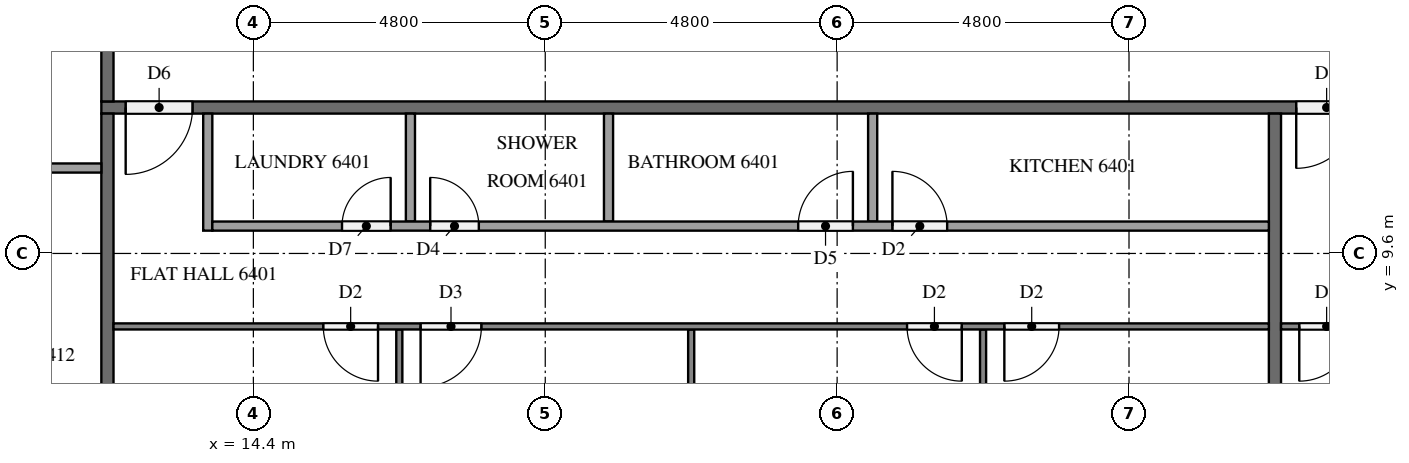
"""IFC4 building model, lengths in metres.
Left out: names, types, materials, properties, quantities, classifications, styles, units other than length and angle.
Written with IfcOpenShell. Run it as: python <this file> out.ifc"""

import sys

from ifc_helpers import new_model, si_unit, direction, frame, frame_2d, origin, place, context, subcontext, project, spatial, rectangle, extrude, element, fill, save


model = new_model("IFC4")
c1 = context("Model", 3, precision=1e-05, world=origin(), true_north=direction((0.0, 1.0)))
c2 = subcontext(c1, "Body", "Model", "MODEL_VIEW")
j1 = project(units=[si_unit("LENGTHUNIT", "METRE"), si_unit("PLANEANGLEUNIT", "RADIAN")], contexts=[c1])
p1 = place(None, origin())
s1 = spatial("IfcSite", under=j1, at=p1, CompositionType="ELEMENT")
p2 = place(p1, origin())
s2 = spatial("IfcBuilding", under=s1, at=p2, CompositionType="ELEMENT")
p3 = place(p2, frame((0.0, 0.0, 245.7)))
s3 = spatial("IfcBuildingStorey", under=s2, at=p3, CompositionType="ELEMENT", Elevation=245.7)
p4 = place(p3, frame((50.5, 12.0, 0.0), z_axis=(0.0, 0.0, 1.0), x_axis=(-1.0, 0.0, 0.0)))
e1 = element("IfcWall", 1, at=p4, inside=s3, PredefinedType="PARTITIONING", context=c2, shape_type="SweptSolid", body=[
    extrude(rectangle(XDim=38.6, YDim=0.2, at=frame_2d((19.3, 0.0))), origin(), (0.0, 0.0, 1.0), 3.2),
])
p5 = place(p4, frame((37.1, 0.0, 0.0)))
e2 = element("IfcOpeningElement", 2, at=p5, cuts=e1, PredefinedType="OPENING", context=c2, shape_type="SweptSolid", body=[
    extrude(rectangle(XDim=1.1, YDim=2.1, at=frame_2d((0.55, 1.05))), frame((0.0, 0.11, 0.0), z_axis=(0.0, -1.0, 0.0), x_axis=(1.0, 0.0, 0.0)), (0.0, 0.0, 1.0), 0.22),
])
p6 = place(p4, frame((17.95, 0.0, 0.0)))
e3 = element("IfcOpeningElement", 3, at=p6, cuts=e1, PredefinedType="OPENING", context=c2, shape_type="SweptSolid", body=[
    extrude(rectangle(XDim=1.0, YDim=2.1, at=frame_2d((0.5, 1.05))), frame((0.0, 0.11, 0.0), z_axis=(0.0, -1.0, 0.0), x_axis=(1.0, 0.0, 0.0)), (0.0, 0.0, 1.0), 0.22),
])
p7 = place(p4, frame((8.35, 0.0, 0.0)))
e4 = element("IfcOpeningElement", 4, at=p7, cuts=e1, PredefinedType="OPENING", context=c2, shape_type="SweptSolid", body=[
    extrude(rectangle(XDim=1.0, YDim=2.1, at=frame_2d((0.5, 1.05))), frame((0.0, 0.11, 0.0), z_axis=(0.0, -1.0, 0.0), x_axis=(1.0, 0.0, 0.0)), (0.0, 0.0, 1.0), 0.22),
])
p8 = place(p3, frame((12.0, 12.1, 0.0), z_axis=(0.0, 0.0, 1.0), x_axis=(0.0, 1.0, 0.0)))
e5 = element("IfcWall", 5, at=p8, inside=s3, PredefinedType="PARTITIONING", context=c2, shape_type="SweptSolid", body=[
    extrude(rectangle(XDim=28.6, YDim=0.2, at=frame_2d((14.3, 0.0))), origin(), (0.0, 0.0, 1.0), 3.2),
])
p9 = place(p8, frame((27.35, 0.0, 0.0)))
e6 = element("IfcOpeningElement", 6, at=p9, cuts=e5, PredefinedType="OPENING", context=c2, shape_type="SweptSolid", body=[
    extrude(rectangle(XDim=1.0, YDim=2.1, at=frame_2d((0.5, 1.05))), frame((0.0, 0.11, 0.0), z_axis=(0.0, -1.0, 0.0), x_axis=(1.0, 0.0, 0.0)), (0.0, 0.0, 1.0), 0.22),
])
p10 = place(p8, frame((17.75, 0.0, 0.0)))
e7 = element("IfcOpeningElement", 7, at=p10, cuts=e5, PredefinedType="OPENING", context=c2, shape_type="SweptSolid", body=[
    extrude(rectangle(XDim=1.0, YDim=2.1, at=frame_2d((0.5, 1.05))), frame((0.0, 0.11, 0.0), z_axis=(0.0, -1.0, 0.0), x_axis=(1.0, 0.0, 0.0)), (0.0, 0.0, 1.0), 0.22),
])
p11 = place(p8, frame((3.35, 0.0, 0.0)))
e8 = element("IfcOpeningElement", 8, at=p11, cuts=e5, PredefinedType="OPENING", context=c2, shape_type="SweptSolid", body=[
    extrude(rectangle(XDim=1.0, YDim=2.1, at=frame_2d((0.5, 1.05))), frame((0.0, 0.11, 0.0), z_axis=(0.0, -1.0, 0.0), x_axis=(1.0, 0.0, 0.0)), (0.0, 0.0, 1.0), 0.22),
])
for number, where, z_axis, x_axis in (
    (9, (31.2, 11.9, 0.0), (0.0, 0.0, 1.0), (0.0, -1.0, 0.0)),
    (10, (12.0, 4.9, 0.0), (0.0, 0.0, 1.0), (0.0, 1.0, 0.0)),
):
    element("IfcWall", number, at=place(p3, frame(where, z_axis=z_axis, x_axis=x_axis)), inside=s3, PredefinedType="PARTITIONING", context=c2, shape_type="SweptSolid", body=[
        extrude(rectangle(XDim=7.0, YDim=0.2, at=frame_2d((3.5, 0.0))), origin(), (0.0, 0.0, 1.0), 3.2),
    ])
for number, where, z_axis, x_axis in (
    (11, (16.8, 8.35, 0.0), (0.0, 0.0, 1.0), (0.0, -1.0, 0.0)),
    (12, (21.6, 8.35, 0.0), (0.0, 0.0, 1.0), (0.0, -1.0, 0.0)),
    (13, (26.4, 8.35, 0.0), (0.0, 0.0, 1.0), (0.0, -1.0, 0.0)),
):
    element("IfcWall", number, at=place(p3, frame(where, z_axis=z_axis, x_axis=x_axis)), inside=s3, PredefinedType="PARTITIONING", context=c2, shape_type="SweptSolid", body=[
        extrude(rectangle(XDim=3.45, YDim=0.1, at=frame_2d((1.725, 0.0))), origin(), (0.0, 0.0, 1.0), 3.2),
    ])
p12 = place(p3, frame((31.1, 8.4, 0.0), z_axis=(0.0, 0.0, 1.0), x_axis=(-1.0, 0.0, 0.0)))
e14 = element("IfcWall", 14, at=p12, inside=s3, PredefinedType="PARTITIONING", context=c2, shape_type="SweptSolid", body=[
    extrude(rectangle(XDim=19.0, YDim=0.1, at=frame_2d((9.5, 0.0))), origin(), (0.0, 0.0, 1.0), 3.2),
])
p13 = place(p12, frame((14.65, 0.0, 0.0)))
e15 = element("IfcOpeningElement", 15, at=p13, cuts=e14, PredefinedType="OPENING", context=c2, shape_type="SweptSolid", body=[
    extrude(rectangle(XDim=0.9, YDim=2.1, at=frame_2d((0.45, 1.05))), frame((0.0, 0.06, 0.0), z_axis=(0.0, -1.0, 0.0), x_axis=(1.0, 0.0, 0.0)), (0.0, 0.0, 1.0), 0.12),
])
p14 = place(p12, frame((12.95, 0.0, 0.0)))
e16 = element("IfcOpeningElement", 16, at=p14, cuts=e14, PredefinedType="OPENING", context=c2, shape_type="SweptSolid", body=[
    extrude(rectangle(XDim=1.0, YDim=2.1, at=frame_2d((0.5, 1.05))), frame((0.0, 0.06, 0.0), z_axis=(0.0, -1.0, 0.0), x_axis=(1.0, 0.0, 0.0)), (0.0, 0.0, 1.0), 0.12),
])
p15 = place(p12, frame((5.05, 0.0, 0.0)))
e17 = element("IfcOpeningElement", 17, at=p15, cuts=e14, PredefinedType="OPENING", context=c2, shape_type="SweptSolid", body=[
    extrude(rectangle(XDim=0.9, YDim=2.1, at=frame_2d((0.45, 1.05))), frame((0.0, 0.06, 0.0), z_axis=(0.0, -1.0, 0.0), x_axis=(1.0, 0.0, 0.0)), (0.0, 0.0, 1.0), 0.12),
])
p16 = place(p12, frame((3.45, 0.0, 0.0)))
e18 = element("IfcOpeningElement", 18, at=p16, cuts=e14, PredefinedType="OPENING", context=c2, shape_type="SweptSolid", body=[
    extrude(rectangle(XDim=0.9, YDim=2.1, at=frame_2d((0.45, 1.05))), frame((0.0, 0.06, 0.0), z_axis=(0.0, -1.0, 0.0), x_axis=(1.0, 0.0, 0.0)), (0.0, 0.0, 1.0), 0.12),
])
for number, where, z_axis, x_axis in (
    (19, (16.983, 11.9, 0.0), (0.0, 0.0, 1.0), (0.0, -1.0, 0.0)),
    (20, (20.24, 11.9, 0.0), (0.0, 0.0, 1.0), (0.0, -1.0, 0.0)),
    (21, (24.584, 11.9, 0.0), (0.0, 0.0, 1.0), (0.0, -1.0, 0.0)),
):
    element("IfcWall", number, at=place(p3, frame(where, z_axis=z_axis, x_axis=x_axis)), inside=s3, PredefinedType="PARTITIONING", context=c2, shape_type="SweptSolid", body=[
        extrude(rectangle(XDim=1.775, YDim=0.15, at=frame_2d((0.887, 0.0))), origin(), (0.0, 0.0, 1.0), 3.2),
    ])
p17 = place(p3, frame((13.65, 11.9, 0.0), z_axis=(0.0, 0.0, 1.0), x_axis=(0.0, -1.0, 0.0)))
e22 = element("IfcWall", 22, at=p17, inside=s3, PredefinedType="PARTITIONING", context=c2, shape_type="SweptSolid", body=[
    extrude(rectangle(XDim=1.925, YDim=0.15, at=frame_2d((0.962, 0.0))), origin(), (0.0, 0.0, 1.0), 3.2),
])
p18 = place(p3, frame((13.725, 10.05, 0.0), z_axis=(0.0, 0.0, 1.0), x_axis=(1.0, 0.0, 0.0)))
e23 = element("IfcWall", 23, at=p18, inside=s3, PredefinedType="PARTITIONING", context=c2, shape_type="SweptSolid", body=[
    extrude(rectangle(XDim=17.375, YDim=0.15, at=frame_2d((8.688, 0.0))), origin(), (0.0, 0.0, 1.0), 3.2),
])
p19 = place(p18, frame((2.133, 0.0, 0.0)))
e24 = element("IfcOpeningElement", 24, at=p19, cuts=e23, PredefinedType="OPENING", context=c2, shape_type="SweptSolid", body=[
    extrude(rectangle(XDim=0.8, YDim=2.1, at=frame_2d((0.4, 1.05))), frame((0.0, 0.085, 0.0), z_axis=(0.0, -1.0, 0.0), x_axis=(1.0, 0.0, 0.0)), (0.0, 0.0, 1.0), 0.17),
])
p20 = place(p18, frame((3.583, 0.0, 0.0)))
e25 = element("IfcOpeningElement", 25, at=p20, cuts=e23, PredefinedType="OPENING", context=c2, shape_type="SweptSolid", body=[
    extrude(rectangle(XDim=0.8, YDim=2.1, at=frame_2d((0.4, 1.05))), frame((0.0, 0.085, 0.0), z_axis=(0.0, -1.0, 0.0), x_axis=(1.0, 0.0, 0.0)), (0.0, 0.0, 1.0), 0.17),
])
p21 = place(p18, frame((9.635, 0.0, 0.0)))
e26 = element("IfcOpeningElement", 26, at=p21, cuts=e23, PredefinedType="OPENING", context=c2, shape_type="SweptSolid", body=[
    extrude(rectangle(XDim=0.9, YDim=2.1, at=frame_2d((0.45, 1.05))), frame((0.0, 0.085, 0.0), z_axis=(0.0, -1.0, 0.0), x_axis=(1.0, 0.0, 0.0)), (0.0, 0.0, 1.0), 0.17),
])
p22 = place(p18, frame((11.184, 0.0, 0.0)))
e27 = element("IfcOpeningElement", 27, at=p22, cuts=e23, PredefinedType="OPENING", context=c2, shape_type="SweptSolid", body=[
    extrude(rectangle(XDim=0.9, YDim=2.1, at=frame_2d((0.45, 1.05))), frame((0.0, 0.085, 0.0), z_axis=(0.0, -1.0, 0.0), x_axis=(1.0, 0.0, 0.0)), (0.0, 0.0, 1.0), 0.17),
])
p23 = place(p3, frame((40.7, 8.4, 0.0), z_axis=(0.0, 0.0, 1.0), x_axis=(-1.0, 0.0, 0.0)))
e28 = element("IfcWall", 28, at=p23, inside=s3, PredefinedType="PARTITIONING", context=c2, shape_type="SweptSolid", body=[
    extrude(rectangle(XDim=9.4, YDim=0.1, at=frame_2d((4.7, 0.0))), origin(), (0.0, 0.0, 1.0), 3.2),
])
p24 = place(p23, frame((8.2, 0.0, 0.0)))
e29 = element("IfcOpeningElement", 29, at=p24, cuts=e28, PredefinedType="OPENING", context=c2, shape_type="SweptSolid", body=[
    extrude(rectangle(XDim=0.9, YDim=2.1, at=frame_2d((0.45, 1.05))), frame((0.0, 0.06, 0.0), z_axis=(0.0, -1.0, 0.0), x_axis=(1.0, 0.0, 0.0)), (0.0, 0.0, 1.0), 0.12),
])
p25 = place(p23, frame((0.3, 0.0, 0.0)))
e30 = element("IfcOpeningElement", 30, at=p25, cuts=e28, PredefinedType="OPENING", context=c2, shape_type="SweptSolid", body=[
    extrude(rectangle(XDim=1.0, YDim=2.1, at=frame_2d((0.5, 1.05))), frame((0.0, 0.06, 0.0), z_axis=(0.0, -1.0, 0.0), x_axis=(1.0, 0.0, 0.0)), (0.0, 0.0, 1.0), 0.12),
])
p26 = place(p3, frame((11.9, 11.005, 0.0), z_axis=(0.0, 0.0, 1.0), x_axis=(-1.0, 0.0, 0.0)))
e31 = element("IfcWall", 31, at=p26, inside=s3, PredefinedType="PARTITIONING", context=c2, shape_type="SweptSolid", body=[
    extrude(rectangle(XDim=2.975, YDim=0.15, at=frame_2d((1.487, 0.0))), origin(), (0.0, 0.0, 1.0), 3.2),
])
p27 = place(p5, origin())
e32 = element("IfcDoor", 32, at=p27, inside=s3, OperationType="SINGLE_SWING_RIGHT", PredefinedType="DOOR", context=c2, shape_type="SweptSolid", body=[
    extrude(rectangle(XDim=1.1, YDim=2.1, at=frame_2d((0.55, 1.05))), frame((0.0, 0.025, 0.0), z_axis=(0.0, -1.0, 0.0), x_axis=(1.0, 0.0, 0.0)), (0.0, 0.0, 1.0), 0.05),
])
fill(e2, e32)
p28 = place(p6, origin())
e33 = element("IfcDoor", 33, at=p28, inside=s3, OperationType="SINGLE_SWING_RIGHT", PredefinedType="DOOR", context=c2, shape_type="SweptSolid", body=[
    extrude(rectangle(XDim=1.0, YDim=2.1, at=frame_2d((0.5, 1.05))), frame((0.0, 0.025, 0.0), z_axis=(0.0, -1.0, 0.0), x_axis=(1.0, 0.0, 0.0)), (0.0, 0.0, 1.0), 0.05),
])
fill(e3, e33)
p29 = place(p13, origin())
e34 = element("IfcDoor", 34, at=p29, inside=s3, OperationType="SINGLE_SWING_LEFT", PredefinedType="DOOR", context=c2, shape_type="SweptSolid", body=[
    extrude(rectangle(XDim=0.9, YDim=2.1, at=frame_2d((0.45, 1.05))), frame((0.0, 0.025, 0.0), z_axis=(0.0, -1.0, 0.0), x_axis=(1.0, 0.0, 0.0)), (0.0, 0.0, 1.0), 0.05),
])
fill(e15, e34)
p30 = place(p14, origin())
e35 = element("IfcDoor", 35, at=p30, inside=s3, OperationType="SINGLE_SWING_RIGHT", PredefinedType="DOOR", context=c2, shape_type="SweptSolid", body=[
    extrude(rectangle(XDim=1.0, YDim=2.1, at=frame_2d((0.5, 1.05))), frame((0.0, 0.025, 0.0), z_axis=(0.0, -1.0, 0.0), x_axis=(1.0, 0.0, 0.0)), (0.0, 0.0, 1.0), 0.05),
])
fill(e16, e35)
p31 = place(p15, origin())
e36 = element("IfcDoor", 36, at=p31, inside=s3, OperationType="SINGLE_SWING_LEFT", PredefinedType="DOOR", context=c2, shape_type="SweptSolid", body=[
    extrude(rectangle(XDim=0.9, YDim=2.1, at=frame_2d((0.45, 1.05))), frame((0.0, 0.025, 0.0), z_axis=(0.0, -1.0, 0.0), x_axis=(1.0, 0.0, 0.0)), (0.0, 0.0, 1.0), 0.05),
])
fill(e17, e36)
p32 = place(p16, origin())
e37 = element("IfcDoor", 37, at=p32, inside=s3, OperationType="SINGLE_SWING_RIGHT", PredefinedType="DOOR", context=c2, shape_type="SweptSolid", body=[
    extrude(rectangle(XDim=0.9, YDim=2.1, at=frame_2d((0.45, 1.05))), frame((0.0, 0.025, 0.0), z_axis=(0.0, -1.0, 0.0), x_axis=(1.0, 0.0, 0.0)), (0.0, 0.0, 1.0), 0.05),
])
fill(e18, e37)
p33 = place(p19, origin())
e38 = element("IfcDoor", 38, at=p33, inside=s3, OperationType="SINGLE_SWING_RIGHT", PredefinedType="DOOR", context=c2, shape_type="SweptSolid", body=[
    extrude(rectangle(XDim=0.8, YDim=2.1, at=frame_2d((0.4, 1.05))), frame((0.0, 0.025, 0.0), z_axis=(0.0, -1.0, 0.0), x_axis=(1.0, 0.0, 0.0)), (0.0, 0.0, 1.0), 0.05),
])
fill(e24, e38)
p34 = place(p20, origin())
e39 = element("IfcDoor", 39, at=p34, inside=s3, OperationType="SINGLE_SWING_LEFT", PredefinedType="DOOR", context=c2, shape_type="SweptSolid", body=[
    extrude(rectangle(XDim=0.8, YDim=2.1, at=frame_2d((0.4, 1.05))), frame((0.0, 0.025, 0.0), z_axis=(0.0, -1.0, 0.0), x_axis=(1.0, 0.0, 0.0)), (0.0, 0.0, 1.0), 0.05),
])
fill(e25, e39)
p35 = place(p21, origin())
e40 = element("IfcDoor", 40, at=p35, inside=s3, OperationType="SINGLE_SWING_RIGHT", PredefinedType="DOOR", context=c2, shape_type="SweptSolid", body=[
    extrude(rectangle(XDim=0.9, YDim=2.1, at=frame_2d((0.45, 1.05))), frame((0.0, 0.025, 0.0), z_axis=(0.0, -1.0, 0.0), x_axis=(1.0, 0.0, 0.0)), (0.0, 0.0, 1.0), 0.05),
])
fill(e26, e40)
p36 = place(p22, origin())
e41 = element("IfcDoor", 41, at=p36, inside=s3, OperationType="SINGLE_SWING_LEFT", PredefinedType="DOOR", context=c2, shape_type="SweptSolid", body=[
    extrude(rectangle(XDim=0.9, YDim=2.1, at=frame_2d((0.45, 1.05))), frame((0.0, 0.025, 0.0), z_axis=(0.0, -1.0, 0.0), x_axis=(1.0, 0.0, 0.0)), (0.0, 0.0, 1.0), 0.05),
])
fill(e27, e41)
p37 = place(p24, origin())
e42 = element("IfcDoor", 42, at=p37, inside=s3, OperationType="SINGLE_SWING_RIGHT", PredefinedType="DOOR", context=c2, shape_type="SweptSolid", body=[
    extrude(rectangle(XDim=0.9, YDim=2.1, at=frame_2d((0.45, 1.05))), frame((0.0, 0.025, 0.0), z_axis=(0.0, -1.0, 0.0), x_axis=(1.0, 0.0, 0.0)), (0.0, 0.0, 1.0), 0.05),
])
fill(e29, e42)
save(model, sys.argv[1])
